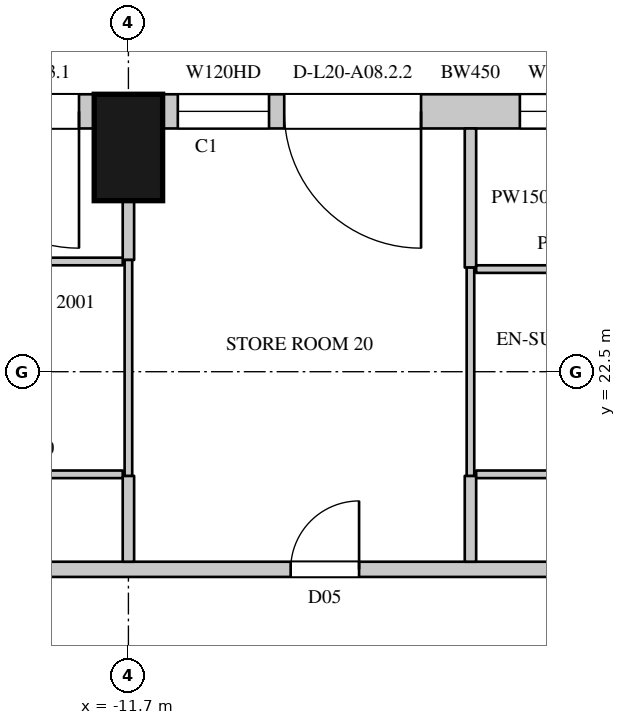
"""IFC4 building model, lengths in metres.
Left out: names, types, materials, properties, quantities, classifications, styles, units other than length and angle.
Written with IfcOpenShell. Run it as: python <this file> out.ifc"""

import sys

from ifc_helpers import new_model, si_unit, direction, frame, frame_2d, origin, origin_2d, place, context, subcontext, project, spatial, rectangle, extrude, element, fill, save


model = new_model("IFC4")
c1 = context("Model", 3, precision=1e-05, world=origin(), true_north=direction((0.0, 1.0)))
c2 = subcontext(c1, "Body", "Model", "MODEL_VIEW")
j1 = project(units=[si_unit("LENGTHUNIT", "METRE"), si_unit("PLANEANGLEUNIT", "RADIAN")], contexts=[c1])
p1 = place(None, origin())
s1 = spatial("IfcSite", under=j1, at=p1, CompositionType="ELEMENT")
p2 = place(p1, origin())
s2 = spatial("IfcBuilding", under=s1, at=p2, CompositionType="ELEMENT")
p3 = place(p2, frame((0.0, 0.0, 102.3)))
s3 = spatial("IfcBuildingStorey", under=s2, at=p3, CompositionType="ELEMENT", Elevation=102.3)
p4 = place(p3, frame((-11.7, 25.45, 0.0), z_axis=(0.0, 0.0, 1.0), x_axis=(-1.0, 0.0, 0.0)))
e1 = element("IfcColumn", 1, at=p4, inside=s3, PredefinedType="COLUMN", context=c2, shape_type="SweptSolid", body=[
    extrude(rectangle(XDim=0.9, YDim=1.4, at=origin_2d()), origin(), (0.0, 0.0, 1.0), 3.6),
])
p5 = place(p3, frame((-3.15, 25.925, 0.0), z_axis=(0.0, 0.0, 1.0), x_axis=(-1.0, 0.0, 0.0)))
e2 = element("IfcWall", 2, at=p5, inside=s3, PredefinedType="SOLIDWALL", context=c2, shape_type="SweptSolid", body=[
    extrude(rectangle(XDim=8.1, YDim=0.45, at=frame_2d((4.05, 0.0))), origin(), (0.0, 0.0, 1.0), 3.3),
])
p6 = place(p5, frame((0.2, 0.0, 0.0)))
e3 = element("IfcOpeningElement", 3, at=p6, cuts=e2, PredefinedType="OPENING", context=c2, shape_type="SweptSolid", body=[
    extrude(rectangle(XDim=1.8, YDim=2.4, at=frame_2d((0.9, 1.2))), frame((0.0, 0.235, 0.0), z_axis=(0.0, -1.0, 0.0), x_axis=(1.0, 0.0, 0.0)), (0.0, 0.0, 1.0), 0.47),
])
p7 = place(p5, frame((2.2, 0.0, 1.05)))
e4 = element("IfcOpeningElement", 4, at=p7, cuts=e2, PredefinedType="OPENING", context=c2, shape_type="SweptSolid", body=[
    extrude(rectangle(XDim=1.2, YDim=2.0, at=frame_2d((0.6, 1.0))), frame((0.0, 0.235, 0.0), z_axis=(0.0, -1.0, 0.0), x_axis=(1.0, 0.0, 0.0)), (0.0, 0.0, 1.0), 0.47),
])
p8 = place(p5, frame((4.7, 0.0, 0.0)))
e5 = element("IfcOpeningElement", 5, at=p8, cuts=e2, PredefinedType="OPENING", context=c2, shape_type="SweptSolid", body=[
    extrude(rectangle(XDim=1.8, YDim=2.4, at=frame_2d((0.9, 1.2))), frame((0.0, 0.235, 0.0), z_axis=(0.0, -1.0, 0.0), x_axis=(1.0, 0.0, 0.0)), (0.0, 0.0, 1.0), 0.47),
])
p9 = place(p5, frame((6.7, 0.0, 1.05)))
e6 = element("IfcOpeningElement", 6, at=p9, cuts=e2, PredefinedType="OPENING", context=c2, shape_type="SweptSolid", body=[
    extrude(rectangle(XDim=1.2, YDim=2.0, at=frame_2d((0.6, 1.0))), frame((0.0, 0.235, 0.0), z_axis=(0.0, -1.0, 0.0), x_axis=(1.0, 0.0, 0.0)), (0.0, 0.0, 1.0), 0.47),
])
p10 = place(p3, frame((-12.15, 25.925, 0.0), z_axis=(0.0, 0.0, 1.0), x_axis=(-1.0, 0.0, 0.0)))
e7 = element("IfcWall", 7, at=p10, inside=s3, PredefinedType="SOLIDWALL", context=c2, shape_type="SweptSolid", body=[
    extrude(rectangle(XDim=8.1, YDim=0.45, at=frame_2d((4.05, 0.0))), origin(), (0.0, 0.0, 1.0), 3.3),
])
p11 = place(p10, frame((0.2, 0.0, 0.0)))
e8 = element("IfcOpeningElement", 8, at=p11, cuts=e7, PredefinedType="OPENING", context=c2, shape_type="SweptSolid", body=[
    extrude(rectangle(XDim=1.8, YDim=2.4, at=frame_2d((0.9, 1.2))), frame((0.0, 0.235, 0.0), z_axis=(0.0, -1.0, 0.0), x_axis=(1.0, 0.0, 0.0)), (0.0, 0.0, 1.0), 0.47),
])
p12 = place(p10, frame((2.2, 0.0, 1.05)))
e9 = element("IfcOpeningElement", 9, at=p12, cuts=e7, PredefinedType="OPENING", context=c2, shape_type="SweptSolid", body=[
    extrude(rectangle(XDim=1.2, YDim=2.0, at=frame_2d((0.6, 1.0))), frame((0.0, 0.235, 0.0), z_axis=(0.0, -1.0, 0.0), x_axis=(1.0, 0.0, 0.0)), (0.0, 0.0, 1.0), 0.47),
])
p13 = place(p10, frame((4.0, 0.0, 0.0)))
e10 = element("IfcOpeningElement", 10, at=p13, cuts=e7, PredefinedType="OPENING", context=c2, shape_type="SweptSolid", body=[
    extrude(rectangle(XDim=1.8, YDim=2.4, at=frame_2d((0.9, 1.2))), frame((0.0, 0.235, 0.0), z_axis=(0.0, -1.0, 0.0), x_axis=(1.0, 0.0, 0.0)), (0.0, 0.0, 1.0), 0.47),
])
p14 = place(p3, frame((-23.765, 19.9, 0.0), z_axis=(0.0, 0.0, 1.0), x_axis=(1.0, 0.0, 0.0)))
e11 = element("IfcWall", 11, at=p14, inside=s3, PredefinedType="PARTITIONING", context=c2, shape_type="SweptSolid", body=[
    extrude(rectangle(XDim=41.549, YDim=0.2, at=frame_2d((20.774, 0.0))), origin(), (0.0, 0.0, 1.0), 3.3),
])
p15 = place(p14, frame((14.2, 0.0, 0.0)))
e12 = element("IfcOpeningElement", 12, at=p15, cuts=e11, PredefinedType="OPENING", context=c2, shape_type="SweptSolid", body=[
    extrude(rectangle(XDim=0.9, YDim=2.2, at=frame_2d((0.45, 1.1))), frame((0.0, 0.11, 0.0), z_axis=(0.0, -1.0, 0.0), x_axis=(1.0, 0.0, 0.0)), (0.0, 0.0, 1.0), 0.22),
])
p16 = place(p14, frame((27.05, 0.0, 0.0)))
e13 = element("IfcOpeningElement", 13, at=p16, cuts=e11, PredefinedType="OPENING", context=c2, shape_type="SweptSolid", body=[
    extrude(rectangle(XDim=0.9, YDim=2.2, at=frame_2d((0.45, 1.1))), frame((0.0, 0.11, 0.0), z_axis=(0.0, -1.0, 0.0), x_axis=(1.0, 0.0, 0.0)), (0.0, 0.0, 1.0), 0.22),
])
p17 = place(p14, frame((0.75, 0.0, 0.0)))
e14 = element("IfcOpeningElement", 14, at=p17, cuts=e11, PredefinedType="OPENING", context=c2, shape_type="SweptSolid", body=[
    extrude(rectangle(XDim=1.1, YDim=2.4, at=frame_2d((0.55, 1.2))), frame((0.0, 0.11, 0.0), z_axis=(0.0, -1.0, 0.0), x_axis=(1.0, 0.0, 0.0)), (0.0, 0.0, 1.0), 0.22),
])
p18 = place(p14, frame((23.15, 0.0, 0.0)))
e15 = element("IfcOpeningElement", 15, at=p18, cuts=e11, PredefinedType="OPENING", context=c2, shape_type="SweptSolid", body=[
    extrude(rectangle(XDim=0.95, YDim=2.2, at=frame_2d((0.475, 1.1))), frame((0.0, 0.11, 0.0), z_axis=(0.0, -1.0, 0.0), x_axis=(1.0, 0.0, 0.0)), (0.0, 0.0, 1.0), 0.22),
])
p19 = place(p14, frame((34.95, 0.0, 0.0)))
e16 = element("IfcOpeningElement", 16, at=p19, cuts=e11, PredefinedType="OPENING", context=c2, shape_type="SweptSolid", body=[
    extrude(rectangle(XDim=0.95, YDim=2.2, at=frame_2d((0.475, 1.1))), frame((0.0, 0.11, 0.0), z_axis=(0.0, -1.0, 0.0), x_axis=(1.0, 0.0, 0.0)), (0.0, 0.0, 1.0), 0.22),
])
p20 = place(p3, frame((-11.7, 20.0, 0.0), z_axis=(0.0, 0.0, 1.0), x_axis=(0.0, 1.0, 0.0)))
e17 = element("IfcWall", 17, at=p20, inside=s3, PredefinedType="PARTITIONING", context=c2, shape_type="SweptSolid", body=[
    extrude(rectangle(XDim=1.13, YDim=0.15, at=frame_2d((0.565, 0.0))), origin(), (0.0, 0.0, 1.0), 2.75),
])
p21 = place(p3, frame((-11.7, 23.97, 0.0), z_axis=(0.0, 0.0, 1.0), x_axis=(0.0, 1.0, 0.0)))
e18 = element("IfcWall", 18, at=p21, inside=s3, PredefinedType="PARTITIONING", context=c2, shape_type="SweptSolid", body=[
    extrude(rectangle(XDim=0.78, YDim=0.15, at=frame_2d((0.39, 0.0))), origin(), (0.0, 0.0, 1.0), 2.75),
])
p22 = place(p3, frame((-7.2, 20.0, 0.0), z_axis=(0.0, 0.0, 1.0), x_axis=(0.0, 1.0, 0.0)))
e19 = element("IfcWall", 19, at=p22, inside=s3, PredefinedType="PARTITIONING", context=c2, shape_type="SweptSolid", body=[
    extrude(rectangle(XDim=1.13, YDim=0.15, at=frame_2d((0.565, 0.0))), origin(), (0.0, 0.0, 1.0), 2.65),
])
p23 = place(p3, frame((-7.2, 23.87, 0.0), z_axis=(0.0, 0.0, 1.0), x_axis=(0.0, 1.0, 0.0)))
e20 = element("IfcWall", 20, at=p23, inside=s3, PredefinedType="PARTITIONING", context=c2, shape_type="SweptSolid", body=[
    extrude(rectangle(XDim=1.83, YDim=0.15, at=frame_2d((0.915, 0.0))), origin(), (0.0, 0.0, 1.0), 2.65),
])
for number, where, z_axis, x_axis in (
    (21, (-14.346, 21.15, 0.0), (0.0, 0.0, 1.0), (1.0, 0.0, 0.0)),
    (22, (-14.346, 23.95, 0.0), (0.0, 0.0, 1.0), (1.0, 0.0, 0.0)),
):
    element("IfcWall", number, at=place(p3, frame(where, z_axis=z_axis, x_axis=x_axis)), inside=s3, PredefinedType="PARTITIONING", context=c2, shape_type="SweptSolid", body=[
        extrude(rectangle(XDim=2.571, YDim=0.1, at=frame_2d((1.286, 0.0))), origin(), (0.0, 0.0, 1.0), 3.3),
    ])
p24 = place(p3, frame((-11.7, 21.13, 0.0), z_axis=(0.0, 0.0, 1.0), x_axis=(0.0, 1.0, 0.0)))
e23 = element("IfcWall", 23, at=p24, inside=s3, PredefinedType="PARTITIONING", context=c2, shape_type="SweptSolid", body=[
    extrude(rectangle(XDim=2.84, YDim=0.1, at=frame_2d((1.42, 0.0))), origin(), (0.0, 0.0, 1.0), 2.75),
])
p25 = place(p3, frame((-7.2, 21.13, 0.0), z_axis=(0.0, 0.0, 1.0), x_axis=(0.0, 1.0, 0.0)))
e24 = element("IfcWall", 24, at=p25, inside=s3, PredefinedType="PARTITIONING", context=c2, shape_type="SweptSolid", body=[
    extrude(rectangle(XDim=2.74, YDim=0.1, at=frame_2d((1.37, 0.0))), origin(), (0.0, 0.0, 1.0), 2.65),
])
p26 = place(p3, frame((-7.125, 21.15, 0.0), z_axis=(0.0, 0.0, 1.0), x_axis=(1.0, 0.0, 0.0)))
e25 = element("IfcWall", 25, at=p26, inside=s3, PredefinedType="PARTITIONING", context=c2, shape_type="SweptSolid", body=[
    extrude(rectangle(XDim=2.371, YDim=0.1, at=frame_2d((1.186, 0.0))), origin(), (0.0, 0.0, 1.0), 3.3),
])
p27 = place(p26, frame((1.25, 0.0, 0.0)))
e26 = element("IfcOpeningElement", 26, at=p27, cuts=e25, PredefinedType="OPENING", context=c2, shape_type="SweptSolid", body=[
    extrude(rectangle(XDim=0.9, YDim=2.2, at=frame_2d((0.45, 1.1))), frame((0.0, 0.06, 0.0), z_axis=(0.0, -1.0, 0.0), x_axis=(1.0, 0.0, 0.0)), (0.0, 0.0, 1.0), 0.12),
])
p28 = place(p3, frame((-7.125, 23.85, 0.0), z_axis=(0.0, 0.0, 1.0), x_axis=(1.0, 0.0, 0.0)))
e27 = element("IfcWall", 27, at=p28, inside=s3, PredefinedType="PARTITIONING", context=c2, shape_type="SweptSolid", body=[
    extrude(rectangle(XDim=2.371, YDim=0.1, at=frame_2d((1.186, 0.0))), origin(), (0.0, 0.0, 1.0), 3.3),
])
p29 = place(p7, origin())
e28 = element("IfcWindow", 28, at=p29, inside=s3, PartitioningType="SINGLE_PANEL", PredefinedType="WINDOW", context=c2, shape_type="SweptSolid", body=[
    extrude(rectangle(XDim=1.2, YDim=2.0, at=frame_2d((0.6, 1.0))), frame((0.0, 0.135, 0.0), z_axis=(0.0, -1.0, 0.0), x_axis=(1.0, 0.0, 0.0)), (0.0, 0.0, 1.0), 0.06),
])
fill(e4, e28)
p30 = place(p8, origin())
e29 = element("IfcDoor", 29, at=p30, inside=s3, OperationType="SLIDING_TO_LEFT", PredefinedType="DOOR", context=c2, shape_type="SweptSolid", body=[
    extrude(rectangle(XDim=1.8, YDim=2.4, at=frame_2d((0.9, 1.2))), frame((0.0, 0.13, 0.0), z_axis=(0.0, -1.0, 0.0), x_axis=(1.0, 0.0, 0.0)), (0.0, 0.0, 1.0), 0.05),
])
fill(e5, e29)
p31 = place(p9, origin())
e30 = element("IfcWindow", 30, at=p31, inside=s3, PartitioningType="SINGLE_PANEL", PredefinedType="WINDOW", context=c2, shape_type="SweptSolid", body=[
    extrude(rectangle(XDim=1.2, YDim=2.0, at=frame_2d((0.6, 1.0))), frame((0.0, 0.135, 0.0), z_axis=(0.0, -1.0, 0.0), x_axis=(1.0, 0.0, 0.0)), (0.0, 0.0, 1.0), 0.06),
])
fill(e6, e30)
p32 = place(p11, origin())
e31 = element("IfcDoor", 31, at=p32, inside=s3, OperationType="SLIDING_TO_LEFT", PredefinedType="DOOR", context=c2, shape_type="SweptSolid", body=[
    extrude(rectangle(XDim=1.8, YDim=2.4, at=frame_2d((0.9, 1.2))), frame((0.0, 0.13, 0.0), z_axis=(0.0, -1.0, 0.0), x_axis=(1.0, 0.0, 0.0)), (0.0, 0.0, 1.0), 0.05),
])
fill(e8, e31)
p33 = place(p15, origin())
e32 = element("IfcDoor", 32, at=p33, inside=s3, OperationType="SINGLE_SWING_RIGHT", PredefinedType="DOOR", context=c2, shape_type="SweptSolid", body=[
    extrude(rectangle(XDim=0.9, YDim=2.2, at=frame_2d((0.45, 1.1))), frame((0.0, 0.025, 0.0), z_axis=(0.0, -1.0, 0.0), x_axis=(1.0, 0.0, 0.0)), (0.0, 0.0, 1.0), 0.05),
])
fill(e12, e32)
save(model, sys.argv[1])
